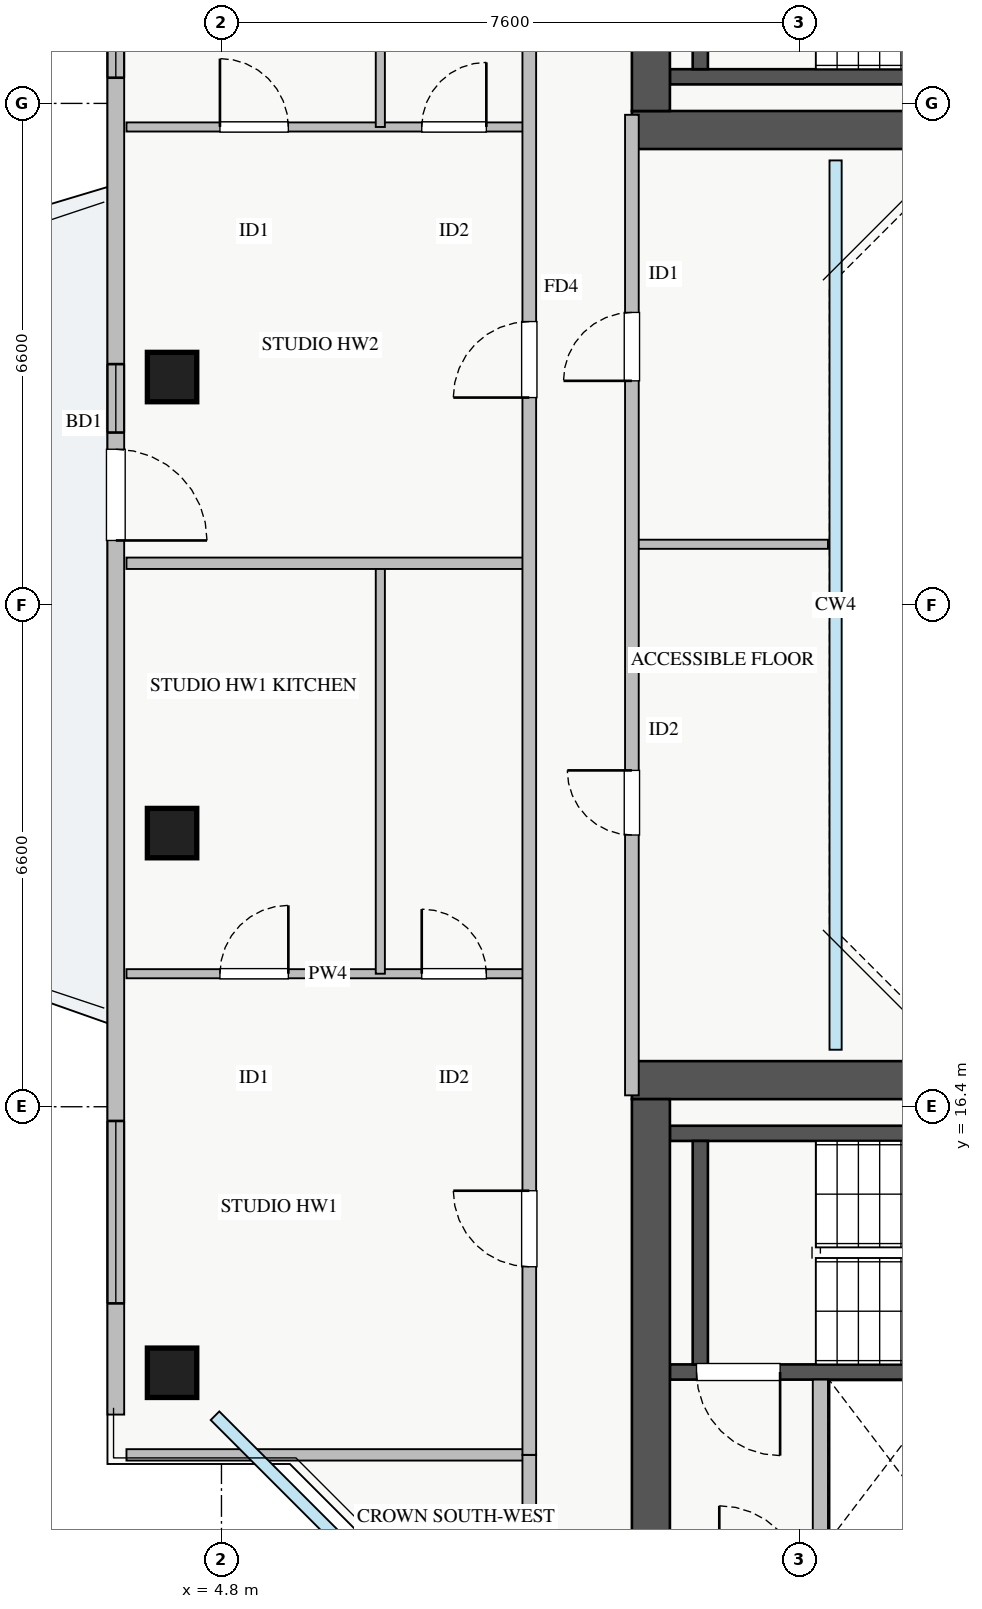
"""IFC4 building model, lengths in metres.
Left out: names, types, materials, properties, quantities, classifications, styles, units other than length and angle.
Written with IfcOpenShell. Run it as: python <this file> out.ifc"""

import sys

from ifc_helpers import new_model, si_unit, direction, frame, frame_2d, origin, origin_2d, place, context, subcontext, project, spatial, rectangle, extrude, source, transform, mapped, element, fill, save


model = new_model("IFC4")
c1 = context("Model", 3, precision=1e-05, world=origin(), true_north=direction((0.0, 1.0)))
c2 = subcontext(c1, "Body", "Model", "MODEL_VIEW")
j1 = project(units=[si_unit("LENGTHUNIT", "METRE"), si_unit("PLANEANGLEUNIT", "RADIAN")], contexts=[c1])
p1 = place(None, origin())
s1 = spatial("IfcSite", under=j1, at=p1, CompositionType="ELEMENT")
p2 = place(p1, origin())
s2 = spatial("IfcBuilding", under=s1, at=p2, CompositionType="ELEMENT")
p3 = place(p2, frame((0.0, 0.0, 247.0)))
s3 = spatial("IfcBuildingStorey", under=s2, at=p3, CompositionType="ELEMENT", Elevation=247.0)
p4 = place(p3, frame((12.68, 12.8, 0.0), z_axis=(0.0, 0.0, 1.0), x_axis=(1.0, 0.0, 0.0)))
e1 = element("IfcWall", 1, at=p4, inside=s3, PredefinedType="SHEAR", context=c2, shape_type="SweptSolid", body=[
    extrude(rectangle(XDim=1.94, YDim=0.18, at=frame_2d((0.97, 0.0))), origin(), (0.0, 0.0, 1.0), 3.07),
])
p5 = place(p3, frame((10.7, 29.95, 0.0), z_axis=(0.0, 0.0, 1.0), x_axis=(1.0, 0.0, 0.0)))
e2 = element("IfcWall", 2, at=p5, inside=s3, PredefinedType="SHEAR", context=c2, shape_type="SweptSolid", body=[
    extrude(rectangle(XDim=7.45, YDim=0.2, at=frame_2d((3.725, 0.0))), origin(), (0.0, 0.0, 1.0), 3.25),
])
p6 = place(p3, frame((11.1, 30.05, 0.0), z_axis=(0.0, 0.0, 1.0), x_axis=(0.0, 1.0, 0.0)))
e3 = element("IfcWall", 3, at=p6, inside=s3, PredefinedType="SHEAR", context=c2, shape_type="SweptSolid", body=[
    extrude(rectangle(XDim=2.94, YDim=0.2, at=frame_2d((1.47, 0.0))), origin(), (0.0, 0.0, 1.0), 3.25),
])
p7 = place(p3, frame((10.7, 12.91, 0.0), z_axis=(0.0, 0.0, 1.0), x_axis=(1.0, 0.0, 0.0)))
e4 = element("IfcWall", 4, at=p7, inside=s3, PredefinedType="SHEAR", context=c2, shape_type="SweptSolid", body=[
    extrude(rectangle(XDim=7.45, YDim=0.2, at=frame_2d((3.725, 0.0))), origin(), (0.0, 0.0, 1.0), 3.25),
])
p8 = place(p7, frame((0.35, 0.0, 0.0)))
e5 = element("IfcOpeningElement", 5, at=p8, cuts=e4, PredefinedType="OPENING", context=c2, shape_type="SweptSolid", body=[
    extrude(rectangle(XDim=1.1, YDim=2.05, at=frame_2d((0.55, 1.025))), frame((0.0, 0.11, 0.0), z_axis=(0.0, -1.0, 0.0), x_axis=(1.0, 0.0, 0.0)), (0.0, 0.0, 1.0), 0.22),
])
p9 = place(p3, frame((10.7, 16.05, 0.0), z_axis=(0.0, 0.0, 1.0), x_axis=(1.0, 0.0, 0.0)))
e6 = element("IfcWall", 6, at=p9, inside=s3, PredefinedType="SHEAR", context=c2, shape_type="SweptSolid", body=[
    extrude(rectangle(XDim=7.45, YDim=0.2, at=frame_2d((3.725, 0.0))), origin(), (0.0, 0.0, 1.0), 3.25),
])
p10 = place(p3, frame((11.1, 13.01, 0.0), z_axis=(0.0, 0.0, 1.0), x_axis=(0.0, 1.0, 0.0)))
e7 = element("IfcWall", 7, at=p10, inside=s3, PredefinedType="SHEAR", context=c2, shape_type="SweptSolid", body=[
    extrude(rectangle(XDim=2.94, YDim=0.2, at=frame_2d((1.47, 0.0))), origin(), (0.0, 0.0, 1.0), 3.25),
])
p11 = place(p3, frame((10.2, 29.25, 0.0), z_axis=(0.0, 0.0, 1.0), x_axis=(1.0, 0.0, 0.0)))
e8 = element("IfcWall", 8, at=p11, inside=s3, PredefinedType="SHEAR", context=c2, shape_type="SweptSolid", body=[
    extrude(rectangle(XDim=17.6, YDim=0.5, at=frame_2d((8.8, 0.0))), origin(), (0.0, 0.0, 1.0), 3.25),
])
p12 = place(p3, frame((10.45, 29.5, 0.0), z_axis=(0.0, 0.0, 1.0), x_axis=(0.0, 1.0, 0.0)))
e9 = element("IfcWall", 9, at=p12, inside=s3, PredefinedType="SHEAR", context=c2, shape_type="SweptSolid", body=[
    extrude(rectangle(XDim=6.2, YDim=0.5, at=frame_2d((3.1, 0.0))), origin(), (0.0, 0.0, 1.0), 3.25),
])
p13 = place(p3, frame((10.2, 16.75, 0.0), z_axis=(0.0, 0.0, 1.0), x_axis=(1.0, 0.0, 0.0)))
e10 = element("IfcWall", 10, at=p13, inside=s3, PredefinedType="SHEAR", context=c2, shape_type="SweptSolid", body=[
    extrude(rectangle(XDim=17.6, YDim=0.5, at=frame_2d((8.8, 0.0))), origin(), (0.0, 0.0, 1.0), 3.25),
])
p14 = place(p3, frame((10.45, 10.3, 0.0), z_axis=(0.0, 0.0, 1.0), x_axis=(0.0, 1.0, 0.0)))
e11 = element("IfcWall", 11, at=p14, inside=s3, PredefinedType="SHEAR", context=c2, shape_type="SweptSolid", body=[
    extrude(rectangle(XDim=6.2, YDim=0.5, at=frame_2d((3.1, 0.0))), origin(), (0.0, 0.0, 1.0), 3.25),
])
m1 = source(origin(), c2, "Body", "SweptSolid", [
    extrude(rectangle(XDim=0.65, YDim=0.65, at=origin_2d()), origin(), (0.0, 0.0, 1.0), 3.25),
])
for number, where, z_axis, x_axis in (
    (12, (4.15, 26.0, 0.0), (0.0, 0.0, 1.0), (1.0, 0.0, 0.0)),
    (13, (4.15, 20.0, 0.0), (0.0, 0.0, 1.0), (1.0, 0.0, 0.0)),
    (14, (4.15, 12.9, 0.0), (0.0, 0.0, 1.0), (1.0, 0.0, 0.0)),
):
    element("IfcColumn", number, at=place(p3, frame(where, z_axis=z_axis, x_axis=x_axis)), inside=s3, PredefinedType="COLUMN", context=c2, shape_type="MappedRepresentation", body=[
        mapped(m1, transform((0.0, 0.0, 0.0), x_axis=(1.0, 0.0, 0.0), y_axis=(0.0, 1.0, 0.0), z_axis=(0.0, 0.0, 1.0), scale=1.0)),
    ])
p15 = place(p3, frame((3.41, 12.35, 0.0), z_axis=(0.0, 0.0, 1.0), x_axis=(0.0, 1.0, 0.0)))
e15 = element("IfcWall", 15, at=p15, inside=s3, PredefinedType="STANDARD", context=c2, shape_type="SweptSolid", body=[
    extrude(rectangle(XDim=21.3, YDim=0.22, at=frame_2d((10.65, 0.0))), origin(), (0.0, 0.0, 1.0), 2.61),
])
p16 = place(p15, frame((11.5, 0.0, 0.0)))
e16 = element("IfcOpeningElement", 16, at=p16, cuts=e15, PredefinedType="OPENING", context=c2, shape_type="SweptSolid", body=[
    extrude(rectangle(XDim=1.2, YDim=2.1, at=frame_2d((0.6, 1.05))), frame((0.0, 0.12, 0.0), z_axis=(0.0, -1.0, 0.0), x_axis=(1.0, 0.0, 0.0)), (0.0, 0.0, 1.0), 0.24),
])
p17 = place(p15, frame((1.463, 0.0, 0.9)))
e17 = element("IfcOpeningElement", 17, at=p17, cuts=e15, PredefinedType="OPENING", context=c2, shape_type="SweptSolid", body=[
    extrude(rectangle(XDim=2.4, YDim=1.48, at=frame_2d((1.2, 0.74))), frame((0.0, 0.12, 0.0), z_axis=(0.0, -1.0, 0.0), x_axis=(1.0, 0.0, 0.0)), (0.0, 0.0, 1.0), 0.24),
])
p18 = place(p15, frame((17.588, 0.0, 0.9)))
e18 = element("IfcOpeningElement", 18, at=p18, cuts=e15, PredefinedType="OPENING", context=c2, shape_type="SweptSolid", body=[
    extrude(rectangle(XDim=2.1, YDim=1.48, at=frame_2d((1.05, 0.74))), frame((0.0, 0.12, 0.0), z_axis=(0.0, -1.0, 0.0), x_axis=(1.0, 0.0, 0.0)), (0.0, 0.0, 1.0), 0.24),
])
p19 = place(p15, frame((12.92, 0.0, 0.9)))
e19 = element("IfcOpeningElement", 19, at=p19, cuts=e15, PredefinedType="OPENING", context=c2, shape_type="SweptSolid", body=[
    extrude(rectangle(XDim=0.9, YDim=1.2, at=frame_2d((0.45, 0.6))), frame((0.0, 0.12, 0.0), z_axis=(0.0, -1.0, 0.0), x_axis=(1.0, 0.0, 0.0)), (0.0, 0.0, 1.0), 0.24),
])
p20 = place(p3, frame((12.68, 10.6, 0.0), z_axis=(0.0, 0.0, 1.0), x_axis=(0.0, 1.0, 0.0)))
e20 = element("IfcWall", 20, at=p20, inside=s3, PredefinedType="PARTITIONING", context=c2, shape_type="SweptSolid", body=[
    extrude(rectangle(XDim=2.21, YDim=0.2, at=frame_2d((1.105, 0.0))), origin(), (0.0, 0.0, 1.0), 3.07),
])
p21 = place(p3, frame((3.55, 11.82, 0.0), z_axis=(0.0, 0.0, 1.0), x_axis=(1.0, 0.0, 0.0)))
e21 = element("IfcWall", 21, at=p21, inside=s3, PredefinedType="PARTITIONING", context=c2, shape_type="SweptSolid", body=[
    extrude(rectangle(XDim=5.3, YDim=0.15, at=frame_2d((2.65, 0.0))), origin(), (0.0, 0.0, 1.0), 3.07),
])
p22 = place(p3, frame((8.85, 8.56, 0.0), z_axis=(0.0, 0.0, 1.0), x_axis=(0.0, 1.0, 0.0)))
e22 = element("IfcWall", 22, at=p22, inside=s3, PredefinedType="PARTITIONING", context=c2, shape_type="SweptSolid", body=[
    extrude(rectangle(XDim=3.26, YDim=0.18, at=frame_2d((1.63, 0.0))), origin(), (0.0, 0.0, 1.0), 2.569),
])
p23 = place(p3, frame((3.55, 18.15, 0.0), z_axis=(0.0, 0.0, 1.0), x_axis=(1.0, 0.0, 0.0)))
e23 = element("IfcWall", 23, at=p23, inside=s3, PredefinedType="PLUMBINGWALL", context=c2, shape_type="SweptSolid", body=[
    extrude(rectangle(XDim=5.3, YDim=0.12, at=frame_2d((2.65, 0.0))), origin(), (0.0, 0.0, 1.0), 2.815),
])
p24 = place(p23, frame((1.23, 0.0, 0.0)))
e24 = element("IfcOpeningElement", 24, at=p24, cuts=e23, PredefinedType="OPENING", context=c2, shape_type="SweptSolid", body=[
    extrude(rectangle(XDim=0.9, YDim=2.05, at=frame_2d((0.45, 1.025))), frame((0.0, 0.07, 0.0), z_axis=(0.0, -1.0, 0.0), x_axis=(1.0, 0.0, 0.0)), (0.0, 0.0, 1.0), 0.14),
])
p25 = place(p23, frame((3.885, 0.0, 0.0)))
e25 = element("IfcOpeningElement", 25, at=p25, cuts=e23, PredefinedType="OPENING", context=c2, shape_type="SweptSolid", body=[
    extrude(rectangle(XDim=0.85, YDim=2.05, at=frame_2d((0.425, 1.025))), frame((0.0, 0.07, 0.0), z_axis=(0.0, -1.0, 0.0), x_axis=(1.0, 0.0, 0.0)), (0.0, 0.0, 1.0), 0.14),
])
p26 = place(p3, frame((6.89, 18.15, 0.0), z_axis=(0.0, 0.0, 1.0), x_axis=(0.0, 1.0, 0.0)))
e26 = element("IfcWall", 26, at=p26, inside=s3, PredefinedType="PLUMBINGWALL", context=c2, shape_type="SweptSolid", body=[
    extrude(rectangle(XDim=5.4, YDim=0.12, at=frame_2d((2.7, 0.0))), origin(), (0.0, 0.0, 1.0), 3.07),
])
p27 = place(p3, frame((3.55, 29.29, 0.0), z_axis=(0.0, 0.0, 1.0), x_axis=(1.0, 0.0, 0.0)))
e27 = element("IfcWall", 27, at=p27, inside=s3, PredefinedType="PLUMBINGWALL", context=c2, shape_type="SweptSolid", body=[
    extrude(rectangle(XDim=5.3, YDim=0.12, at=frame_2d((2.65, 0.0))), origin(), (0.0, 0.0, 1.0), 3.07),
])
p28 = place(p27, frame((1.23, 0.0, 0.0)))
e28 = element("IfcOpeningElement", 28, at=p28, cuts=e27, PredefinedType="OPENING", context=c2, shape_type="SweptSolid", body=[
    extrude(rectangle(XDim=0.9, YDim=2.05, at=frame_2d((0.45, 1.025))), frame((0.0, 0.07, 0.0), z_axis=(0.0, -1.0, 0.0), x_axis=(1.0, 0.0, 0.0)), (0.0, 0.0, 1.0), 0.14),
])
p29 = place(p27, frame((3.885, 0.0, 0.0)))
e29 = element("IfcOpeningElement", 29, at=p29, cuts=e27, PredefinedType="OPENING", context=c2, shape_type="SweptSolid", body=[
    extrude(rectangle(XDim=0.85, YDim=2.05, at=frame_2d((0.425, 1.025))), frame((0.0, 0.07, 0.0), z_axis=(0.0, -1.0, 0.0), x_axis=(1.0, 0.0, 0.0)), (0.0, 0.0, 1.0), 0.14),
])
p30 = place(p3, frame((6.89, 29.29, 0.0), z_axis=(0.0, 0.0, 1.0), x_axis=(0.0, 1.0, 0.0)))
e30 = element("IfcWall", 30, at=p30, inside=s3, PredefinedType="PLUMBINGWALL", context=c2, shape_type="SweptSolid", body=[
    extrude(rectangle(XDim=4.89, YDim=0.12, at=frame_2d((2.445, 0.0))), origin(), (0.0, 0.0, 1.0), 3.07),
])
p31 = place(p3, frame((3.55, 23.55, 0.0), z_axis=(0.0, 0.0, 1.0), x_axis=(1.0, 0.0, 0.0)))
e31 = element("IfcWall", 31, at=p31, inside=s3, PredefinedType="PARTITIONING", context=c2, shape_type="SweptSolid", body=[
    extrude(rectangle(XDim=5.3, YDim=0.15, at=frame_2d((2.65, 0.0))), origin(), (0.0, 0.0, 1.0), 3.07),
])
p32 = place(p3, frame((8.85, 11.82, 0.0), z_axis=(0.0, 0.0, 1.0), x_axis=(0.0, 1.0, 0.0)))
e32 = element("IfcWall", 32, at=p32, inside=s3, PredefinedType="PARTITIONING", context=c2, shape_type="SweptSolid", body=[
    extrude(rectangle(XDim=22.36, YDim=0.18, at=frame_2d((11.18, 0.0))), origin(), (0.0, 0.0, 1.0), 2.569),
])
p33 = place(p32, frame((2.475, 0.0, 0.0)))
e33 = element("IfcOpeningElement", 33, at=p33, cuts=e32, PredefinedType="OPENING", context=c2, shape_type="SweptSolid", body=[
    extrude(rectangle(XDim=1.0, YDim=2.05, at=frame_2d((0.5, 1.025))), frame((0.0, 0.1, 0.0), z_axis=(0.0, -1.0, 0.0), x_axis=(1.0, 0.0, 0.0)), (0.0, 0.0, 1.0), 0.2),
])
p34 = place(p32, frame((13.91, 0.0, 0.0)))
e34 = element("IfcOpeningElement", 34, at=p34, cuts=e32, PredefinedType="OPENING", context=c2, shape_type="SweptSolid", body=[
    extrude(rectangle(XDim=1.0, YDim=2.05, at=frame_2d((0.5, 1.025))), frame((0.0, 0.1, 0.0), z_axis=(0.0, -1.0, 0.0), x_axis=(1.0, 0.0, 0.0)), (0.0, 0.0, 1.0), 0.2),
])
p35 = place(p3, frame((10.2, 23.8, 0.0), z_axis=(0.0, 0.0, 1.0), x_axis=(1.0, 0.0, 0.0)))
e35 = element("IfcWall", 35, at=p35, inside=s3, PredefinedType="PLUMBINGWALL", context=c2, shape_type="SweptSolid", body=[
    extrude(rectangle(XDim=2.58, YDim=0.12, at=frame_2d((1.29, 0.0))), origin(), (0.0, 0.0, 1.0), 3.07),
])
p36 = place(p3, frame((10.2, 16.55, 0.0), z_axis=(0.0, 0.0, 1.0), x_axis=(0.0, 1.0, 0.0)))
e36 = element("IfcWall", 36, at=p36, inside=s3, PredefinedType="PARTITIONING", context=c2, shape_type="SweptSolid", body=[
    extrude(rectangle(XDim=12.9, YDim=0.18, at=frame_2d((6.45, 0.0))), origin(), (0.0, 0.0, 1.0), 3.07),
])
p37 = place(p36, frame((3.425, 0.0, 0.0)))
e37 = element("IfcOpeningElement", 37, at=p37, cuts=e36, PredefinedType="OPENING", context=c2, shape_type="SweptSolid", body=[
    extrude(rectangle(XDim=0.85, YDim=2.05, at=frame_2d((0.425, 1.025))), frame((0.0, 0.1, 0.0), z_axis=(0.0, -1.0, 0.0), x_axis=(1.0, 0.0, 0.0)), (0.0, 0.0, 1.0), 0.2),
])
p38 = place(p36, frame((9.4, 0.0, 0.0)))
e38 = element("IfcOpeningElement", 38, at=p38, cuts=e36, PredefinedType="OPENING", context=c2, shape_type="SweptSolid", body=[
    extrude(rectangle(XDim=0.9, YDim=2.05, at=frame_2d((0.45, 1.025))), frame((0.0, 0.1, 0.0), z_axis=(0.0, -1.0, 0.0), x_axis=(1.0, 0.0, 0.0)), (0.0, 0.0, 1.0), 0.2),
])
m2 = source(origin(), c2, "Body", "SweptSolid", [
    extrude(rectangle(XDim=1.2, YDim=2.1, at=frame_2d((0.6, 1.05))), frame((0.0, 0.025, 0.0), z_axis=(0.0, -1.0, 0.0), x_axis=(1.0, 0.0, 0.0)), (0.0, 0.0, 1.0), 0.05),
])
p39 = place(p16, frame((1.2, 0.0, 0.0), z_axis=(0.0, 0.0, 1.0), x_axis=(-1.0, 0.0, 0.0)))
e39 = element("IfcDoor", 39, at=p39, inside=s3, OperationType="SINGLE_SWING_LEFT", PredefinedType="DOOR", context=c2, shape_type="MappedRepresentation", body=[
    mapped(m2, transform((0.0, 0.0, 0.0), x_axis=(1.0, 0.0, 0.0), y_axis=(0.0, 1.0, 0.0), z_axis=(0.0, 0.0, 1.0), scale=1.0)),
])
fill(e16, e39)
m3 = source(origin(), c2, "Body", "SweptSolid", [
    extrude(rectangle(XDim=2.4, YDim=1.48, at=frame_2d((1.2, 0.74))), frame((0.0, 0.03, 0.0), z_axis=(0.0, -1.0, 0.0), x_axis=(1.0, 0.0, 0.0)), (0.0, 0.0, 1.0), 0.06),
])
p40 = place(p17, origin())
e40 = element("IfcWindow", 40, at=p40, inside=s3, PartitioningType="TRIPLE_PANEL_VERTICAL", PredefinedType="WINDOW", context=c2, shape_type="MappedRepresentation", body=[
    mapped(m3, transform((0.0, 0.0, 0.0), x_axis=(1.0, 0.0, 0.0), y_axis=(0.0, 1.0, 0.0), z_axis=(0.0, 0.0, 1.0), scale=1.0)),
])
fill(e17, e40)
m4 = source(origin(), c2, "Body", "SweptSolid", [
    extrude(rectangle(XDim=2.1, YDim=1.48, at=frame_2d((1.05, 0.74))), frame((0.0, 0.03, 0.0), z_axis=(0.0, -1.0, 0.0), x_axis=(1.0, 0.0, 0.0)), (0.0, 0.0, 1.0), 0.06),
])
p41 = place(p18, origin())
e41 = element("IfcWindow", 41, at=p41, inside=s3, PartitioningType="TRIPLE_PANEL_VERTICAL", PredefinedType="WINDOW", context=c2, shape_type="MappedRepresentation", body=[
    mapped(m4, transform((0.0, 0.0, 0.0), x_axis=(1.0, 0.0, 0.0), y_axis=(0.0, 1.0, 0.0), z_axis=(0.0, 0.0, 1.0), scale=1.0)),
])
fill(e18, e41)
m5 = source(origin(), c2, "Body", "SweptSolid", [
    extrude(rectangle(XDim=1.1, YDim=2.05, at=frame_2d((0.55, 1.025))), frame((0.0, 0.025, 0.0), z_axis=(0.0, -1.0, 0.0), x_axis=(1.0, 0.0, 0.0)), (0.0, 0.0, 1.0), 0.05),
])
p42 = place(p8, frame((1.1, 0.0, 0.0), z_axis=(0.0, 0.0, 1.0), x_axis=(-1.0, 0.0, 0.0)))
e42 = element("IfcDoor", 42, at=p42, inside=s3, OperationType="SINGLE_SWING_RIGHT", PredefinedType="DOOR", context=c2, shape_type="MappedRepresentation", body=[
    mapped(m5, transform((0.0, 0.0, 0.0), x_axis=(1.0, 0.0, 0.0), y_axis=(0.0, 1.0, 0.0), z_axis=(0.0, 0.0, 1.0), scale=1.0)),
])
fill(e5, e42)
m6 = source(origin(), c2, "Body", "SweptSolid", [
    extrude(rectangle(XDim=0.9, YDim=2.05, at=frame_2d((0.45, 1.025))), frame((0.0, 0.025, 0.0), z_axis=(0.0, -1.0, 0.0), x_axis=(1.0, 0.0, 0.0)), (0.0, 0.0, 1.0), 0.05),
])
p43 = place(p24, origin())
e43 = element("IfcDoor", 43, at=p43, inside=s3, OperationType="SINGLE_SWING_RIGHT", PredefinedType="DOOR", context=c2, shape_type="MappedRepresentation", body=[
    mapped(m6, transform((0.0, 0.0, 0.0), x_axis=(1.0, 0.0, 0.0), y_axis=(0.0, 1.0, 0.0), z_axis=(0.0, 0.0, 1.0), scale=1.0)),
])
fill(e24, e43)
m7 = source(origin(), c2, "Body", "SweptSolid", [
    extrude(rectangle(XDim=0.85, YDim=2.05, at=frame_2d((0.425, 1.025))), frame((0.0, 0.025, 0.0), z_axis=(0.0, -1.0, 0.0), x_axis=(1.0, 0.0, 0.0)), (0.0, 0.0, 1.0), 0.05),
])
p44 = place(p25, origin())
e44 = element("IfcDoor", 44, at=p44, inside=s3, OperationType="SINGLE_SWING_LEFT", PredefinedType="DOOR", context=c2, shape_type="MappedRepresentation", body=[
    mapped(m7, transform((0.0, 0.0, 0.0), x_axis=(1.0, 0.0, 0.0), y_axis=(0.0, 1.0, 0.0), z_axis=(0.0, 0.0, 1.0), scale=1.0)),
])
fill(e25, e44)
p45 = place(p28, origin())
e45 = element("IfcDoor", 45, at=p45, inside=s3, OperationType="SINGLE_SWING_LEFT", PredefinedType="DOOR", context=c2, shape_type="MappedRepresentation", body=[
    mapped(m6, transform((0.0, 0.0, 0.0), x_axis=(1.0, 0.0, 0.0), y_axis=(0.0, 1.0, 0.0), z_axis=(0.0, 0.0, 1.0), scale=1.0)),
])
fill(e28, e45)
p46 = place(p29, origin())
e46 = element("IfcDoor", 46, at=p46, inside=s3, OperationType="SINGLE_SWING_RIGHT", PredefinedType="DOOR", context=c2, shape_type="MappedRepresentation", body=[
    mapped(m7, transform((0.0, 0.0, 0.0), x_axis=(1.0, 0.0, 0.0), y_axis=(0.0, 1.0, 0.0), z_axis=(0.0, 0.0, 1.0), scale=1.0)),
])
fill(e29, e46)
m8 = source(origin(), c2, "Body", "SweptSolid", [
    extrude(rectangle(XDim=1.0, YDim=2.05, at=frame_2d((0.5, 1.025))), frame((0.0, 0.025, 0.0), z_axis=(0.0, -1.0, 0.0), x_axis=(1.0, 0.0, 0.0)), (0.0, 0.0, 1.0), 0.05),
])
p47 = place(p33, origin())
e47 = element("IfcDoor", 47, at=p47, inside=s3, OperationType="SINGLE_SWING_RIGHT", PredefinedType="DOOR", context=c2, shape_type="MappedRepresentation", body=[
    mapped(m8, transform((0.0, 0.0, 0.0), x_axis=(1.0, 0.0, 0.0), y_axis=(0.0, 1.0, 0.0), z_axis=(0.0, 0.0, 1.0), scale=1.0)),
])
fill(e33, e47)
p48 = place(p34, origin())
e48 = element("IfcDoor", 48, at=p48, inside=s3, OperationType="SINGLE_SWING_LEFT", PredefinedType="DOOR", context=c2, shape_type="MappedRepresentation", body=[
    mapped(m8, transform((0.0, 0.0, 0.0), x_axis=(1.0, 0.0, 0.0), y_axis=(0.0, 1.0, 0.0), z_axis=(0.0, 0.0, 1.0), scale=1.0)),
])
fill(e34, e48)
p49 = place(p37, origin())
e49 = element("IfcDoor", 49, at=p49, inside=s3, OperationType="SINGLE_SWING_RIGHT", PredefinedType="DOOR", context=c2, shape_type="MappedRepresentation", body=[
    mapped(m7, transform((0.0, 0.0, 0.0), x_axis=(1.0, 0.0, 0.0), y_axis=(0.0, 1.0, 0.0), z_axis=(0.0, 0.0, 1.0), scale=1.0)),
])
fill(e37, e49)
p50 = place(p38, origin())
e50 = element("IfcDoor", 50, at=p50, inside=s3, OperationType="SINGLE_SWING_LEFT", PredefinedType="DOOR", context=c2, shape_type="MappedRepresentation", body=[
    mapped(m6, transform((0.0, 0.0, 0.0), x_axis=(1.0, 0.0, 0.0), y_axis=(0.0, 1.0, 0.0), z_axis=(0.0, 0.0, 1.0), scale=1.0)),
])
fill(e38, e50)
m9 = source(origin(), c2, "Body", "SweptSolid", [
    extrude(rectangle(XDim=0.9, YDim=1.2, at=frame_2d((0.45, 0.6))), frame((0.0, 0.03, 0.0), z_axis=(0.0, -1.0, 0.0), x_axis=(1.0, 0.0, 0.0)), (0.0, 0.0, 1.0), 0.06),
])
p51 = place(p19, origin())
e51 = element("IfcWindow", 51, at=p51, inside=s3, PartitioningType="SINGLE_PANEL", PredefinedType="WINDOW", context=c2, shape_type="MappedRepresentation", body=[
    mapped(m9, transform((0.0, 0.0, 0.0), x_axis=(1.0, 0.0, 0.0), y_axis=(0.0, 1.0, 0.0), z_axis=(0.0, 0.0, 1.0), scale=1.0)),
])
fill(e19, e51)
save(model, sys.argv[1])
